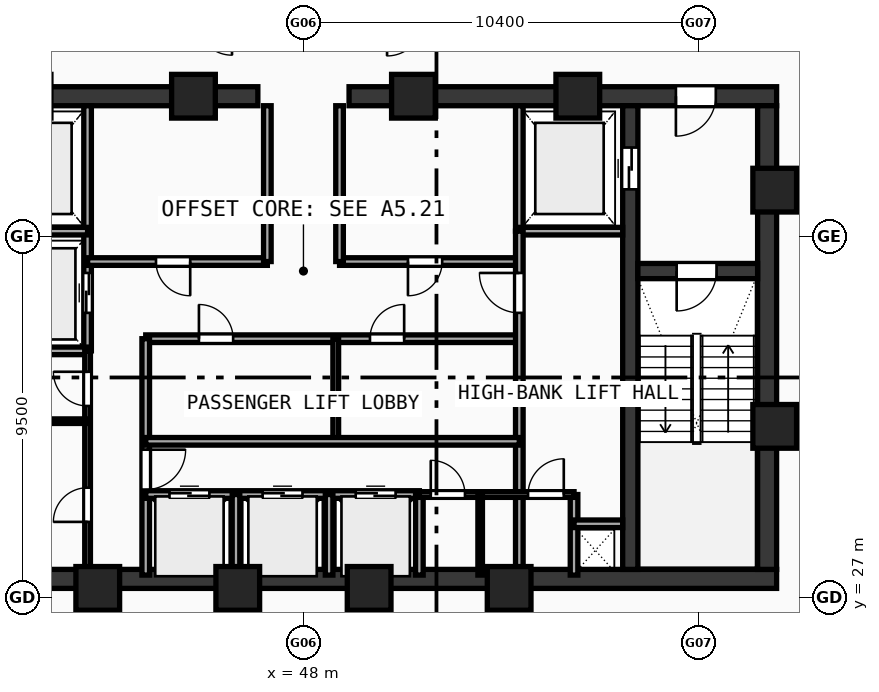
"""IFC4 building model, lengths in metres.
Left out: names, types, materials, properties, quantities, classifications, styles, units other than length and angle.
Written with IfcOpenShell. Run it as: python <this file> out.ifc"""

import sys

from ifc_helpers import new_model, si_unit, direction, frame, frame_2d, origin, origin_with_axes, origin_2d, place, context, subcontext, project, spatial, rectangle, hollow_rectangle, extrude, source, transform, mapped, element, fill, save


model = new_model("IFC4")
c1 = context("Model", 3, precision=1e-05, world=origin(), true_north=direction((0.0, 1.0)))
c2 = subcontext(c1, "Body", "Model", "MODEL_VIEW")
j1 = project(units=[si_unit("LENGTHUNIT", "METRE"), si_unit("PLANEANGLEUNIT", "RADIAN")], contexts=[c1])
p1 = place(None, origin())
s1 = spatial("IfcSite", under=j1, at=p1, CompositionType="ELEMENT")
p2 = place(p1, origin())
s2 = spatial("IfcBuilding", under=s1, at=p2, CompositionType="ELEMENT")
p3 = place(p2, frame((0.0, 0.0, 336.76)))
s3 = spatial("IfcBuildingStorey", under=s2, at=p3, CompositionType="ELEMENT", Elevation=336.76)
p4 = place(p3, frame((35.55, 27.5, 0.0), z_axis=(0.0, 0.0, 1.0), x_axis=(1.0, 0.0, 0.0)))
e1 = element("IfcWall", 1, at=p4, inside=s3, PredefinedType="SHEAR", context=c2, shape_type="SweptSolid", body=[
    extrude(rectangle(XDim=24.9, YDim=0.5, at=frame_2d((12.45, 0.0))), origin(), (0.0, 0.0, 1.0), 3.49),
])
p5 = place(p3, frame((35.55, 40.2, 0.0), z_axis=(0.0, 0.0, 1.0), x_axis=(1.0, 0.0, 0.0)))
e2 = element("IfcWall", 2, at=p5, inside=s3, PredefinedType="SHEAR", context=c2, shape_type="SweptSolid", body=[
    extrude(rectangle(XDim=11.25, YDim=0.5, at=frame_2d((5.625, 0.0))), origin(), (0.0, 0.0, 1.0), 3.49),
])
p6 = place(p5, frame((1.6, 0.0, 0.0)))
e3 = element("IfcOpeningElement", 3, at=p6, cuts=e2, PredefinedType="OPENING", context=c2, shape_type="SweptSolid", body=[
    extrude(rectangle(XDim=1.05, YDim=2.1, at=frame_2d((0.525, 1.05))), frame((0.0, 0.26, 0.0), z_axis=(0.0, -1.0, 0.0), x_axis=(1.0, 0.0, 0.0)), (0.0, 0.0, 1.0), 0.52),
])
p7 = place(p3, frame((49.2, 40.2, 0.0), z_axis=(0.0, 0.0, 1.0), x_axis=(1.0, 0.0, 0.0)))
e4 = element("IfcWall", 4, at=p7, inside=s3, PredefinedType="SHEAR", context=c2, shape_type="SweptSolid", body=[
    extrude(rectangle(XDim=11.25, YDim=0.5, at=frame_2d((5.625, 0.0))), origin(), (0.0, 0.0, 1.0), 3.49),
])
p8 = place(p7, frame((8.6, 0.0, 0.0)))
e5 = element("IfcOpeningElement", 5, at=p8, cuts=e4, PredefinedType="OPENING", context=c2, shape_type="SweptSolid", body=[
    extrude(rectangle(XDim=1.05, YDim=2.1, at=frame_2d((0.525, 1.05))), frame((0.0, 0.26, 0.0), z_axis=(0.0, -1.0, 0.0), x_axis=(1.0, 0.0, 0.0)), (0.0, 0.0, 1.0), 0.52),
])
p9 = place(p3, frame((60.2, 27.75, 0.0), z_axis=(0.0, 0.0, 1.0), x_axis=(0.0, 1.0, 0.0)))
e6 = element("IfcWall", 6, at=p9, inside=s3, PredefinedType="SHEAR", context=c2, shape_type="SweptSolid", body=[
    extrude(rectangle(XDim=12.2, YDim=0.5, at=frame_2d((6.1, 0.0))), origin(), (0.0, 0.0, 1.0), 3.49),
])
p10 = place(p3, frame((56.6, 27.75, 0.0), z_axis=(0.0, 0.0, 1.0), x_axis=(0.0, 1.0, 0.0)))
e7 = element("IfcWall", 7, at=p10, inside=s3, PredefinedType="SHEAR", context=c2, shape_type="SweptSolid", body=[
    extrude(rectangle(XDim=12.2, YDim=0.4, at=frame_2d((6.1, 0.0))), origin(), (0.0, 0.0, 1.0), 3.49),
])
p11 = place(p10, frame((10.0, 0.0, 0.0)))
e8 = element("IfcOpeningElement", 8, at=p11, cuts=e7, PredefinedType="OPENING", context=c2, shape_type="SweptSolid", body=[
    extrude(rectangle(XDim=1.1, YDim=2.1, at=frame_2d((0.55, 1.05))), frame((0.0, 0.21, 0.0), z_axis=(0.0, -1.0, 0.0), x_axis=(1.0, 0.0, 0.0)), (0.0, 0.0, 1.0), 0.42),
])
p12 = place(p3, frame((56.8, 35.6, 0.0), z_axis=(0.0, 0.0, 1.0), x_axis=(1.0, 0.0, 0.0)))
e9 = element("IfcWall", 9, at=p12, inside=s3, PredefinedType="SHEAR", context=c2, shape_type="SweptSolid", body=[
    extrude(rectangle(XDim=3.15, YDim=0.4, at=frame_2d((1.575, 0.0))), origin(), (0.0, 0.0, 1.0), 3.49),
])
p13 = place(p12, frame((1.02, 0.0, 0.0)))
e10 = element("IfcOpeningElement", 10, at=p13, cuts=e9, PredefinedType="OPENING", context=c2, shape_type="SweptSolid", body=[
    extrude(rectangle(XDim=1.05, YDim=2.1, at=frame_2d((0.525, 1.05))), frame((0.0, 0.21, 0.0), z_axis=(0.0, -1.0, 0.0), x_axis=(1.0, 0.0, 0.0)), (0.0, 0.0, 1.0), 0.42),
])
m1 = source(origin(), c2, "Body", "SweptSolid", [
    extrude(hollow_rectangle(XDim=1.15, YDim=1.15, WallThickness=0.048, at=origin_2d()), origin(), (0.0, 0.0, 1.0), 3.75),
])
for number, where, z_axis, x_axis in (
    (11, (42.588, 27.25, -0.26), (0.0, 0.0, 1.0), (1.0, 0.0, 0.0)),
    (12, (46.272, 27.25, -0.26), (0.0, 0.0, 1.0), (1.0, 0.0, 0.0)),
    (13, (49.729, 27.25, -0.26), (0.0, 0.0, 1.0), (1.0, 0.0, 0.0)),
    (14, (53.412, 27.25, -0.26), (0.0, 0.0, 1.0), (1.0, 0.0, 0.0)),
    (15, (60.4, 31.513, -0.26), (0.0, 0.0, 1.0), (1.0, 0.0, 0.0)),
    (16, (60.4, 37.729, -0.26), (0.0, 0.0, 1.0), (1.0, 0.0, 0.0)),
    (17, (55.219, 40.2, -0.26), (0.0, 0.0, 1.0), (1.0, 0.0, 0.0)),
    (18, (50.894, 40.2, -0.26), (0.0, 0.0, 1.0), (1.0, 0.0, 0.0)),
    (19, (45.106, 40.2, -0.26), (0.0, 0.0, 1.0), (1.0, 0.0, 0.0)),
):
    element("IfcColumn", number, at=place(p3, frame(where, z_axis=z_axis, x_axis=x_axis)), inside=s3, PredefinedType="COLUMN", context=c2, shape_type="MappedRepresentation", body=[
        mapped(m1, transform((0.0, 0.0, 0.0), scale=1.0)),
    ])
p14 = place(p3, frame((42.32, 33.5, 0.0), z_axis=(0.0, 0.0, 1.0), x_axis=(0.0, 1.0, 0.0)))
e20 = element("IfcWall", 20, at=p14, inside=s3, PredefinedType="SOLIDWALL", context=c2, shape_type="SweptSolid", body=[
    extrude(rectangle(XDim=6.45, YDim=0.2, at=frame_2d((3.225, 0.0))), origin(), (0.0, 0.0, 1.0), 3.49),
])
p15 = place(p14, frame((1.0, 0.0, 0.0)))
e21 = element("IfcOpeningElement", 21, at=p15, cuts=e20, PredefinedType="OPENING", context=c2, shape_type="SweptSolid", body=[
    extrude(rectangle(XDim=1.05, YDim=2.1, at=frame_2d((0.525, 1.05))), frame((0.0, 0.11, 0.0), z_axis=(0.0, -1.0, 0.0), x_axis=(1.0, 0.0, 0.0)), (0.0, 0.0, 1.0), 0.22),
])
for number, where, z_axis, x_axis in (
    (22, (39.6, 36.65, 0.0), (0.0, 0.0, 1.0), (1.0, 0.0, 0.0)),
    (23, (39.6, 33.5, 0.0), (0.0, 0.0, 1.0), (1.0, 0.0, 0.0)),
):
    element("IfcWall", number, at=place(p3, frame(where, z_axis=z_axis, x_axis=x_axis)), inside=s3, PredefinedType="SOLIDWALL", context=c2, shape_type="SweptSolid", body=[
        extrude(rectangle(XDim=2.72, YDim=0.2, at=frame_2d((1.36, 0.0))), origin(), (0.0, 0.0, 1.0), 3.49),
    ])
p16 = place(p3, frame((53.68, 36.65, 0.0), z_axis=(0.0, 0.0, 1.0), x_axis=(0.0, 1.0, 0.0)))
e24 = element("IfcWall", 24, at=p16, inside=s3, PredefinedType="SOLIDWALL", context=c2, shape_type="SweptSolid", body=[
    extrude(rectangle(XDim=3.3, YDim=0.2, at=frame_2d((1.65, 0.0))), origin(), (0.0, 0.0, 1.0), 3.49),
])
p17 = place(p3, frame((53.68, 36.65, 0.0), z_axis=(0.0, 0.0, 1.0), x_axis=(1.0, 0.0, 0.0)))
e25 = element("IfcWall", 25, at=p17, inside=s3, PredefinedType="SOLIDWALL", context=c2, shape_type="SweptSolid", body=[
    extrude(rectangle(XDim=2.72, YDim=0.2, at=frame_2d((1.36, 0.0))), origin(), (0.0, 0.0, 1.0), 3.49),
])
p18 = place(p3, frame((42.32, 35.85, 0.0), z_axis=(0.0, 0.0, 1.0), x_axis=(1.0, 0.0, 0.0)))
e26 = element("IfcWall", 26, at=p18, inside=s3, PredefinedType="SOLIDWALL", context=c2, shape_type="SweptSolid", body=[
    extrude(rectangle(XDim=4.73, YDim=0.2, at=frame_2d((2.365, 0.0))), origin(), (0.0, 0.0, 1.0), 3.49),
])
p19 = place(p18, frame((1.8, 0.0, 0.0)))
e27 = element("IfcOpeningElement", 27, at=p19, cuts=e26, PredefinedType="OPENING", context=c2, shape_type="SweptSolid", body=[
    extrude(rectangle(XDim=0.9, YDim=2.1, at=frame_2d((0.45, 1.05))), frame((0.0, 0.11, 0.0), z_axis=(0.0, -1.0, 0.0), x_axis=(1.0, 0.0, 0.0)), (0.0, 0.0, 1.0), 0.22),
])
p20 = place(p3, frame((48.95, 35.85, 0.0), z_axis=(0.0, 0.0, 1.0), x_axis=(1.0, 0.0, 0.0)))
e28 = element("IfcWall", 28, at=p20, inside=s3, PredefinedType="SOLIDWALL", context=c2, shape_type="SweptSolid", body=[
    extrude(rectangle(XDim=4.73, YDim=0.2, at=frame_2d((2.365, 0.0))), origin(), (0.0, 0.0, 1.0), 3.49),
])
p21 = place(p20, frame((1.8, 0.0, 0.0)))
e29 = element("IfcOpeningElement", 29, at=p21, cuts=e28, PredefinedType="OPENING", context=c2, shape_type="SweptSolid", body=[
    extrude(rectangle(XDim=0.9, YDim=2.1, at=frame_2d((0.45, 1.05))), frame((0.0, 0.11, 0.0), z_axis=(0.0, -1.0, 0.0), x_axis=(1.0, 0.0, 0.0)), (0.0, 0.0, 1.0), 0.22),
])
for number, where, z_axis, x_axis in (
    (30, (47.05, 35.85, 0.0), (0.0, 0.0, 1.0), (0.0, 1.0, 0.0)),
    (31, (48.95, 35.85, 0.0), (0.0, 0.0, 1.0), (0.0, 1.0, 0.0)),
):
    element("IfcWall", number, at=place(p3, frame(where, z_axis=z_axis, x_axis=x_axis)), inside=s3, PredefinedType="SOLIDWALL", context=c2, shape_type="SweptSolid", body=[
        extrude(rectangle(XDim=4.1, YDim=0.2, at=frame_2d((2.05, 0.0))), origin(), (0.0, 0.0, 1.0), 3.49),
    ])
p22 = place(p3, frame((43.85, 33.82, 0.0), z_axis=(0.0, 0.0, 1.0), x_axis=(1.0, 0.0, 0.0)))
e32 = element("IfcWall", 32, at=p22, inside=s3, PredefinedType="SOLIDWALL", context=c2, shape_type="SweptSolid", body=[
    extrude(rectangle(XDim=9.83, YDim=0.2, at=frame_2d((4.915, 0.0))), origin(), (0.0, 0.0, 1.0), 3.49),
])
p23 = place(p22, frame((1.4, 0.0, 0.0)))
e33 = element("IfcOpeningElement", 33, at=p23, cuts=e32, PredefinedType="OPENING", context=c2, shape_type="SweptSolid", body=[
    extrude(rectangle(XDim=0.9, YDim=2.1, at=frame_2d((0.45, 1.05))), frame((0.0, 0.11, 0.0), z_axis=(0.0, -1.0, 0.0), x_axis=(1.0, 0.0, 0.0)), (0.0, 0.0, 1.0), 0.22),
])
p24 = place(p22, frame((5.9, 0.0, 0.0)))
e34 = element("IfcOpeningElement", 34, at=p24, cuts=e32, PredefinedType="OPENING", context=c2, shape_type="SweptSolid", body=[
    extrude(rectangle(XDim=0.9, YDim=2.1, at=frame_2d((0.45, 1.05))), frame((0.0, 0.11, 0.0), z_axis=(0.0, -1.0, 0.0), x_axis=(1.0, 0.0, 0.0)), (0.0, 0.0, 1.0), 0.22),
])
p25 = place(p3, frame((43.85, 27.6, 0.0), z_axis=(0.0, 0.0, 1.0), x_axis=(0.0, 1.0, 0.0)))
e35 = element("IfcWall", 35, at=p25, inside=s3, PredefinedType="SOLIDWALL", context=c2, shape_type="SweptSolid", body=[
    extrude(rectangle(XDim=6.22, YDim=0.2, at=frame_2d((3.11, 0.0))), origin(), (0.0, 0.0, 1.0), 3.49),
])
p26 = place(p25, frame((2.25, 0.0, 0.0)))
e36 = element("IfcOpeningElement", 36, at=p26, cuts=e35, PredefinedType="OPENING", context=c2, shape_type="SweptSolid", body=[
    extrude(rectangle(XDim=1.05, YDim=2.1, at=frame_2d((0.525, 1.05))), frame((0.0, 0.11, 0.0), z_axis=(0.0, -1.0, 0.0), x_axis=(1.0, 0.0, 0.0)), (0.0, 0.0, 1.0), 0.22),
])
p27 = place(p3, frame((53.68, 27.6, 0.0), z_axis=(0.0, 0.0, 1.0), x_axis=(0.0, 1.0, 0.0)))
e37 = element("IfcWall", 37, at=p27, inside=s3, PredefinedType="SOLIDWALL", context=c2, shape_type="SweptSolid", body=[
    extrude(rectangle(XDim=9.05, YDim=0.2, at=frame_2d((4.525, 0.0))), origin(), (0.0, 0.0, 1.0), 3.49),
])
p28 = place(p27, frame((6.9, 0.0, 0.0)))
e38 = element("IfcOpeningElement", 38, at=p28, cuts=e37, PredefinedType="OPENING", context=c2, shape_type="SweptSolid", body=[
    extrude(rectangle(XDim=1.05, YDim=2.1, at=frame_2d((0.525, 1.05))), frame((0.0, 0.11, 0.0), z_axis=(0.0, -1.0, 0.0), x_axis=(1.0, 0.0, 0.0)), (0.0, 0.0, 1.0), 0.22),
])
p29 = place(p3, frame((48.85, 31.12, 0.0), z_axis=(0.0, 0.0, 1.0), x_axis=(0.0, 1.0, 0.0)))
e39 = element("IfcWall", 39, at=p29, inside=s3, PredefinedType="PARTITIONING", context=c2, shape_type="SweptSolid", body=[
    extrude(rectangle(XDim=2.7, YDim=0.15, at=frame_2d((1.35, 0.0))), origin(), (0.0, 0.0, 1.0), 3.49),
])
p30 = place(p3, frame((43.85, 29.72, 0.0), z_axis=(0.0, 0.0, 1.0), x_axis=(1.0, 0.0, 0.0)))
e40 = element("IfcWall", 40, at=p30, inside=s3, PredefinedType="SOLIDWALL", context=c2, shape_type="SweptSolid", body=[
    extrude(rectangle(XDim=7.2, YDim=0.2, at=frame_2d((3.6, 0.0))), origin(), (0.0, 0.0, 1.0), 3.49),
])
p31 = place(p30, frame((0.625, 0.0, 0.0)))
e41 = element("IfcOpeningElement", 41, at=p31, cuts=e40, PredefinedType="OPENING", context=c2, shape_type="SweptSolid", body=[
    extrude(rectangle(XDim=1.05, YDim=2.1, at=frame_2d((0.525, 1.05))), frame((0.0, 0.11, 0.0), z_axis=(0.0, -1.0, 0.0), x_axis=(1.0, 0.0, 0.0)), (0.0, 0.0, 1.0), 0.22),
])
p32 = place(p30, frame((3.075, 0.0, 0.0)))
e42 = element("IfcOpeningElement", 42, at=p32, cuts=e40, PredefinedType="OPENING", context=c2, shape_type="SweptSolid", body=[
    extrude(rectangle(XDim=1.05, YDim=2.1, at=frame_2d((0.525, 1.05))), frame((0.0, 0.11, 0.0), z_axis=(0.0, -1.0, 0.0), x_axis=(1.0, 0.0, 0.0)), (0.0, 0.0, 1.0), 0.22),
])
p33 = place(p30, frame((5.525, 0.0, 0.0)))
e43 = element("IfcOpeningElement", 43, at=p33, cuts=e40, PredefinedType="OPENING", context=c2, shape_type="SweptSolid", body=[
    extrude(rectangle(XDim=1.05, YDim=2.1, at=frame_2d((0.525, 1.05))), frame((0.0, 0.11, 0.0), z_axis=(0.0, -1.0, 0.0), x_axis=(1.0, 0.0, 0.0)), (0.0, 0.0, 1.0), 0.22),
])
p34 = place(p3, frame((51.05, 27.6, 0.0), z_axis=(0.0, 0.0, 1.0), x_axis=(0.0, 1.0, 0.0)))
e44 = element("IfcWall", 44, at=p34, inside=s3, PredefinedType="SOLIDWALL", context=c2, shape_type="SweptSolid", body=[
    extrude(rectangle(XDim=2.12, YDim=0.2, at=frame_2d((1.06, 0.0))), origin(), (0.0, 0.0, 1.0), 3.49),
])
p35 = place(p3, frame((43.85, 31.12, 0.0), z_axis=(0.0, 0.0, 1.0), x_axis=(1.0, 0.0, 0.0)))
e45 = element("IfcWall", 45, at=p35, inside=s3, PredefinedType="SOLIDWALL", context=c2, shape_type="SweptSolid", body=[
    extrude(rectangle(XDim=9.83, YDim=0.2, at=frame_2d((4.915, 0.0))), origin(), (0.0, 0.0, 1.0), 3.49),
])
for number, where, z_axis, x_axis in (
    (46, (46.225, 27.6, 0.0), (0.0, 0.0, 1.0), (0.0, 1.0, 0.0)),
    (47, (48.675, 27.6, 0.0), (0.0, 0.0, 1.0), (0.0, 1.0, 0.0)),
    (48, (55.12, 27.6, 0.0), (0.0, 0.0, 1.0), (0.0, 1.0, 0.0)),
):
    element("IfcWall", number, at=place(p3, frame(where, z_axis=z_axis, x_axis=x_axis)), inside=s3, PredefinedType="SOLIDWALL", context=c2, shape_type="SweptSolid", body=[
        extrude(rectangle(XDim=2.12, YDim=0.2, at=frame_2d((1.06, 0.0))), origin(), (0.0, 0.0, 1.0), 3.49),
    ])
p36 = place(p3, frame((55.12, 28.95, 0.0), z_axis=(0.0, 0.0, 1.0), x_axis=(1.0, 0.0, 0.0)))
e49 = element("IfcWall", 49, at=p36, inside=s3, PredefinedType="SOLIDWALL", context=c2, shape_type="SweptSolid", body=[
    extrude(rectangle(XDim=1.28, YDim=0.2, at=frame_2d((0.64, 0.0))), origin(), (0.0, 0.0, 1.0), 3.49),
])
p37 = place(p3, frame((42.32, 27.6, 0.0), z_axis=(0.0, 0.0, 1.0), x_axis=(0.0, 1.0, 0.0)))
e50 = element("IfcWall", 50, at=p37, inside=s3, PredefinedType="PARTITIONING", context=c2, shape_type="SweptSolid", body=[
    extrude(rectangle(XDim=5.9, YDim=0.15, at=frame_2d((2.95, 0.0))), origin(), (0.0, 0.0, 1.0), 3.49),
])
p38 = place(p37, frame((1.4, 0.0, 0.0)))
e51 = element("IfcOpeningElement", 51, at=p38, cuts=e50, PredefinedType="OPENING", context=c2, shape_type="SweptSolid", body=[
    extrude(rectangle(XDim=0.9, YDim=2.1, at=frame_2d((0.45, 1.05))), frame((0.0, 0.085, 0.0), z_axis=(0.0, -1.0, 0.0), x_axis=(1.0, 0.0, 0.0)), (0.0, 0.0, 1.0), 0.17),
])
p39 = place(p37, frame((4.45, 0.0, 0.0)))
e52 = element("IfcOpeningElement", 52, at=p39, cuts=e50, PredefinedType="OPENING", context=c2, shape_type="SweptSolid", body=[
    extrude(rectangle(XDim=0.9, YDim=2.1, at=frame_2d((0.45, 1.05))), frame((0.0, 0.085, 0.0), z_axis=(0.0, -1.0, 0.0), x_axis=(1.0, 0.0, 0.0)), (0.0, 0.0, 1.0), 0.17),
])
p40 = place(p3, frame((51.05, 29.72, 0.0), z_axis=(0.0, 0.0, 1.0), x_axis=(1.0, 0.0, 0.0)))
e53 = element("IfcWall", 53, at=p40, inside=s3, PredefinedType="PARTITIONING", context=c2, shape_type="SweptSolid", body=[
    extrude(rectangle(XDim=4.07, YDim=0.15, at=frame_2d((2.035, 0.0))), origin(), (0.0, 0.0, 1.0), 3.49),
])
p41 = place(p40, frame((0.3, 0.0, 0.0)))
e54 = element("IfcOpeningElement", 54, at=p41, cuts=e53, PredefinedType="OPENING", context=c2, shape_type="SweptSolid", body=[
    extrude(rectangle(XDim=0.9, YDim=2.1, at=frame_2d((0.45, 1.05))), frame((0.0, 0.085, 0.0), z_axis=(0.0, -1.0, 0.0), x_axis=(1.0, 0.0, 0.0)), (0.0, 0.0, 1.0), 0.17),
])
p42 = place(p40, frame((2.86, 0.0, 0.0)))
e55 = element("IfcOpeningElement", 55, at=p42, cuts=e53, PredefinedType="OPENING", context=c2, shape_type="SweptSolid", body=[
    extrude(rectangle(XDim=0.94, YDim=2.1, at=frame_2d((0.47, 1.05))), frame((0.0, 0.085, 0.0), z_axis=(0.0, -1.0, 0.0), x_axis=(1.0, 0.0, 0.0)), (0.0, 0.0, 1.0), 0.17),
])
p43 = place(p3, frame((39.6, 31.65, 0.0), z_axis=(0.0, 0.0, 1.0), x_axis=(1.0, 0.0, 0.0)))
e56 = element("IfcWall", 56, at=p43, inside=s3, PredefinedType="PARTITIONING", context=c2, shape_type="SweptSolid", body=[
    extrude(rectangle(XDim=2.72, YDim=0.12, at=frame_2d((1.36, 0.0))), origin(), (0.0, 0.0, 1.0), 3.49),
])
p44 = place(p3, frame((52.65, 27.6, 0.0), z_axis=(0.0, 0.0, 1.0), x_axis=(0.0, 1.0, 0.0)))
e57 = element("IfcWall", 57, at=p44, inside=s3, PredefinedType="PARTITIONING", context=c2, shape_type="SweptSolid", body=[
    extrude(rectangle(XDim=2.12, YDim=0.12, at=frame_2d((1.06, 0.0))), origin(), (0.0, 0.0, 1.0), 3.49),
])
m2 = source(origin(), c2, "Body", "SweptSolid", [
    extrude(rectangle(XDim=1.05, YDim=2.1, at=frame_2d((0.525, 1.05))), frame((0.0, 0.025, 0.0), z_axis=(0.0, -1.0, 0.0), x_axis=(1.0, 0.0, 0.0)), (0.0, 0.0, 1.0), 0.05),
])
p45 = place(p13, frame((1.05, 0.0, 0.0), z_axis=(0.0, 0.0, 1.0), x_axis=(-1.0, 0.0, 0.0)))
e58 = element("IfcDoor", 58, at=p45, inside=s3, OperationType="SINGLE_SWING_RIGHT", PredefinedType="DOOR", context=c2, shape_type="MappedRepresentation", body=[
    mapped(m2, transform((0.0, 0.0, 0.0), scale=1.0)),
])
fill(e10, e58)
p46 = place(p8, frame((1.05, 0.0, 0.0), z_axis=(0.0, 0.0, 1.0), x_axis=(-1.0, 0.0, 0.0)))
e59 = element("IfcDoor", 59, at=p46, inside=s3, OperationType="SINGLE_SWING_RIGHT", PredefinedType="DOOR", context=c2, shape_type="MappedRepresentation", body=[
    mapped(m2, transform((0.0, 0.0, 0.0), scale=1.0)),
])
fill(e5, e59)
m3 = source(origin(), c2, "Body", "SweptSolid", [
    extrude(rectangle(XDim=1.1, YDim=2.1, at=frame_2d((0.55, 1.05))), frame((0.0, 0.025, 0.0), z_axis=(0.0, -1.0, 0.0), x_axis=(1.0, 0.0, 0.0)), (0.0, 0.0, 1.0), 0.05),
])
p47 = place(p11, origin_with_axes())
e60 = element("IfcDoor", 60, at=p47, inside=s3, OperationType="DOUBLE_DOOR_SLIDING", PredefinedType="DOOR", context=c2, shape_type="MappedRepresentation", body=[
    mapped(m3, transform((0.0, 0.0, 0.0), scale=1.0)),
])
fill(e8, e60)
p48 = place(p15, origin_with_axes())
e61 = element("IfcDoor", 61, at=p48, inside=s3, OperationType="DOUBLE_DOOR_SLIDING", PredefinedType="DOOR", context=c2, shape_type="MappedRepresentation", body=[
    mapped(m2, transform((0.0, 0.0, 0.0), scale=1.0)),
])
fill(e21, e61)
m4 = source(origin(), c2, "Body", "SweptSolid", [
    extrude(rectangle(XDim=0.9, YDim=2.1, at=frame_2d((0.45, 1.05))), frame((0.0, 0.025, 0.0), z_axis=(0.0, -1.0, 0.0), x_axis=(1.0, 0.0, 0.0)), (0.0, 0.0, 1.0), 0.05),
])
p49 = place(p19, frame((0.9, 0.0, 0.0), z_axis=(0.0, 0.0, 1.0), x_axis=(-1.0, 0.0, 0.0)))
e62 = element("IfcDoor", 62, at=p49, inside=s3, OperationType="SINGLE_SWING_LEFT", PredefinedType="DOOR", context=c2, shape_type="MappedRepresentation", body=[
    mapped(m4, transform((0.0, 0.0, 0.0), scale=1.0)),
])
fill(e27, e62)
p50 = place(p21, frame((0.9, 0.0, 0.0), z_axis=(0.0, 0.0, 1.0), x_axis=(-1.0, 0.0, 0.0)))
e63 = element("IfcDoor", 63, at=p50, inside=s3, OperationType="SINGLE_SWING_RIGHT", PredefinedType="DOOR", context=c2, shape_type="MappedRepresentation", body=[
    mapped(m4, transform((0.0, 0.0, 0.0), scale=1.0)),
])
fill(e29, e63)
p51 = place(p23, origin_with_axes())
e64 = element("IfcDoor", 64, at=p51, inside=s3, OperationType="SINGLE_SWING_LEFT", PredefinedType="DOOR", context=c2, shape_type="MappedRepresentation", body=[
    mapped(m4, transform((0.0, 0.0, 0.0), scale=1.0)),
])
fill(e33, e64)
p52 = place(p24, origin_with_axes())
e65 = element("IfcDoor", 65, at=p52, inside=s3, OperationType="SINGLE_SWING_RIGHT", PredefinedType="DOOR", context=c2, shape_type="MappedRepresentation", body=[
    mapped(m4, transform((0.0, 0.0, 0.0), scale=1.0)),
])
fill(e34, e65)
p53 = place(p26, frame((1.05, 0.0, 0.0), z_axis=(0.0, 0.0, 1.0), x_axis=(-1.0, 0.0, 0.0)))
e66 = element("IfcDoor", 66, at=p53, inside=s3, OperationType="SINGLE_SWING_LEFT", PredefinedType="DOOR", context=c2, shape_type="MappedRepresentation", body=[
    mapped(m2, transform((0.0, 0.0, 0.0), scale=1.0)),
])
fill(e36, e66)
p54 = place(p28, origin_with_axes())
e67 = element("IfcDoor", 67, at=p54, inside=s3, OperationType="SINGLE_SWING_RIGHT", PredefinedType="DOOR", context=c2, shape_type="MappedRepresentation", body=[
    mapped(m2, transform((0.0, 0.0, 0.0), scale=1.0)),
])
fill(e38, e67)
p55 = place(p31, origin_with_axes())
e68 = element("IfcDoor", 68, at=p55, inside=s3, OperationType="DOUBLE_DOOR_SLIDING", PredefinedType="DOOR", context=c2, shape_type="MappedRepresentation", body=[
    mapped(m2, transform((0.0, 0.0, 0.0), scale=1.0)),
])
fill(e41, e68)
p56 = place(p32, origin_with_axes())
e69 = element("IfcDoor", 69, at=p56, inside=s3, OperationType="DOUBLE_DOOR_SLIDING", PredefinedType="DOOR", context=c2, shape_type="MappedRepresentation", body=[
    mapped(m2, transform((0.0, 0.0, 0.0), scale=1.0)),
])
fill(e42, e69)
p57 = place(p33, origin_with_axes())
e70 = element("IfcDoor", 70, at=p57, inside=s3, OperationType="DOUBLE_DOOR_SLIDING", PredefinedType="DOOR", context=c2, shape_type="MappedRepresentation", body=[
    mapped(m2, transform((0.0, 0.0, 0.0), scale=1.0)),
])
fill(e43, e70)
p58 = place(p38, origin_with_axes())
e71 = element("IfcDoor", 71, at=p58, inside=s3, OperationType="SINGLE_SWING_LEFT", PredefinedType="DOOR", context=c2, shape_type="MappedRepresentation", body=[
    mapped(m4, transform((0.0, 0.0, 0.0), scale=1.0)),
])
fill(e51, e71)
p59 = place(p39, origin_with_axes())
e72 = element("IfcDoor", 72, at=p59, inside=s3, OperationType="SINGLE_SWING_RIGHT", PredefinedType="DOOR", context=c2, shape_type="MappedRepresentation", body=[
    mapped(m4, transform((0.0, 0.0, 0.0), scale=1.0)),
])
fill(e52, e72)
p60 = place(p41, origin_with_axes())
e73 = element("IfcDoor", 73, at=p60, inside=s3, OperationType="SINGLE_SWING_LEFT", PredefinedType="DOOR", context=c2, shape_type="MappedRepresentation", body=[
    mapped(m4, transform((0.0, 0.0, 0.0), scale=1.0)),
])
fill(e54, e73)
m5 = source(origin(), c2, "Body", "SweptSolid", [
    extrude(rectangle(XDim=0.94, YDim=2.1, at=frame_2d((0.47, 1.05))), frame((0.0, 0.025, 0.0), z_axis=(0.0, -1.0, 0.0), x_axis=(1.0, 0.0, 0.0)), (0.0, 0.0, 1.0), 0.05),
])
p61 = place(p42, origin_with_axes())
e74 = element("IfcDoor", 74, at=p61, inside=s3, OperationType="SINGLE_SWING_RIGHT", PredefinedType="DOOR", context=c2, shape_type="MappedRepresentation", body=[
    mapped(m5, transform((0.0, 0.0, 0.0), scale=1.0)),
])
fill(e55, e74)
save(model, sys.argv[1])
